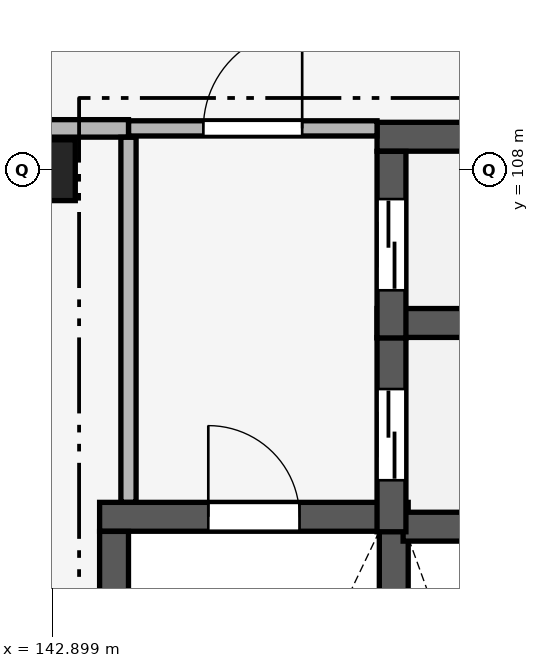
"""IFC4 building model, lengths in metres.
Left out: names, types, materials, properties, quantities, classifications, styles, units other than length and angle.
Written with IfcOpenShell. Run it as: python <this file> out.ifc"""

import sys

from ifc_helpers import new_model, si_unit, direction, frame, frame_2d, origin, origin_2d, place, context, subcontext, project, spatial, rectangle, extrude, element, fill, save


model = new_model("IFC4")
c1 = context("Model", 3, precision=1e-05, world=origin(), true_north=direction((0.0, 1.0)))
c2 = subcontext(c1, "Body", "Model", "MODEL_VIEW")
j1 = project(units=[si_unit("LENGTHUNIT", "METRE"), si_unit("PLANEANGLEUNIT", "RADIAN")], contexts=[c1])
p1 = place(None, origin())
s1 = spatial("IfcSite", under=j1, at=p1, CompositionType="ELEMENT")
p2 = place(p1, origin())
s2 = spatial("IfcBuilding", under=s1, at=p2, CompositionType="ELEMENT")
p3 = place(p2, frame((0.0, 0.0, 20.4)))
s3 = spatial("IfcBuildingStorey", under=s2, at=p3, CompositionType="ELEMENT", Elevation=20.4)
p4 = place(p3, frame((142.8, 108.0, 0.0), z_axis=(0.0, 0.0, 1.0), x_axis=(1.0, 0.0, 0.0)))
e1 = element("IfcColumn", 1, at=p4, inside=s3, PredefinedType="COLUMN", context=c2, shape_type="SweptSolid", body=[
    extrude(rectangle(XDim=0.8, YDim=0.8, at=origin_2d()), origin(), (0.0, 0.0, 1.0), 4.8),
])
p5 = place(p3, frame((143.52, 103.44, 0.0), z_axis=(0.0, 0.0, 1.0), x_axis=(1.0, 0.0, 0.0)))
e2 = element("IfcWall", 2, at=p5, inside=s3, PredefinedType="SHEAR", context=c2, shape_type="SweptSolid", body=[
    extrude(rectangle(XDim=4.06, YDim=0.38, at=frame_2d((2.03, 0.0))), origin(), (0.0, 0.0, 1.0), 4.55),
])
p6 = place(p5, frame((1.43, 0.0, 0.0)))
e3 = element("IfcOpeningElement", 3, at=p6, cuts=e2, PredefinedType="OPENING", context=c2, shape_type="SweptSolid", body=[
    extrude(rectangle(XDim=1.2, YDim=2.2, at=frame_2d((0.6, 1.1))), frame((0.0, 0.205, 0.0), z_axis=(0.0, -1.0, 0.0), x_axis=(1.0, 0.0, 0.0)), (0.0, 0.0, 1.0), 0.41),
])
for number, where, z_axis, x_axis in (
    (4, (143.71, 96.352, 0.0), (0.0, 0.0, 1.0), (0.0, 1.0, 0.0)),
    (5, (147.39, 96.352, 0.0), (0.0, 0.0, 1.0), (0.0, 1.0, 0.0)),
):
    element("IfcWall", number, at=place(p3, frame(where, z_axis=z_axis, x_axis=x_axis)), inside=s3, PredefinedType="SHEAR", context=c2, shape_type="SweptSolid", body=[
        extrude(rectangle(XDim=6.896, YDim=0.38, at=frame_2d((3.448, 0.0))), origin(), (0.0, 0.0, 1.0), 4.55),
    ])
p7 = place(p3, frame((147.513, 103.31, 0.0), z_axis=(0.0, 0.0, 1.0), x_axis=(1.0, 0.0, 0.0)))
e6 = element("IfcWall", 6, at=p7, inside=s3, PredefinedType="SHEAR", context=c2, shape_type="SweptSolid", body=[
    extrude(rectangle(XDim=2.917, YDim=0.38, at=frame_2d((1.458, 0.0))), origin(), (0.0, 0.0, 1.0), 4.55),
])
p8 = place(p3, frame((147.17, 105.99, 0.0), z_axis=(0.0, 0.0, 1.0), x_axis=(1.0, 0.0, 0.0)))
e7 = element("IfcWall", 7, at=p8, inside=s3, PredefinedType="SHEAR", context=c2, shape_type="SweptSolid", body=[
    extrude(rectangle(XDim=3.26, YDim=0.38, at=frame_2d((1.63, 0.0))), origin(), (0.0, 0.0, 1.0), 4.55),
])
p9 = place(p3, frame((147.36, 103.243, 0.0), z_axis=(0.0, 0.0, 1.0), x_axis=(0.0, 1.0, 0.0)))
e8 = element("IfcWall", 8, at=p9, inside=s3, PredefinedType="SHEAR", context=c2, shape_type="SweptSolid", body=[
    extrude(rectangle(XDim=2.555, YDim=0.38, at=frame_2d((1.278, 0.0))), origin(), (0.0, 0.0, 1.0), 4.55),
])
p10 = place(p9, frame((0.678, 0.0, 0.0)))
e9 = element("IfcOpeningElement", 9, at=p10, cuts=e8, PredefinedType="OPENING", context=c2, shape_type="SweptSolid", body=[
    extrude(rectangle(XDim=1.2, YDim=2.15, at=frame_2d((0.6, 1.075))), frame((0.0, 0.205, 0.0), z_axis=(0.0, -1.0, 0.0), x_axis=(1.0, 0.0, 0.0)), (0.0, 0.0, 1.0), 0.41),
])
p11 = place(p3, frame((147.17, 108.44, 0.0), z_axis=(0.0, 0.0, 1.0), x_axis=(1.0, 0.0, 0.0)))
e10 = element("IfcWall", 10, at=p11, inside=s3, PredefinedType="SHEAR", context=c2, shape_type="SweptSolid", body=[
    extrude(rectangle(XDim=3.637, YDim=0.38, at=frame_2d((1.818, 0.0))), origin(), (0.0, 0.0, 1.0), 4.55),
])
p12 = place(p3, frame((147.36, 105.793, 0.0), z_axis=(0.0, 0.0, 1.0), x_axis=(0.0, 1.0, 0.0)))
e11 = element("IfcWall", 11, at=p12, inside=s3, PredefinedType="SHEAR", context=c2, shape_type="SweptSolid", body=[
    extrude(rectangle(XDim=2.455, YDim=0.38, at=frame_2d((1.228, 0.0))), origin(), (0.0, 0.0, 1.0), 4.55),
])
p13 = place(p12, frame((0.627, 0.0, 0.0)))
e12 = element("IfcOpeningElement", 12, at=p13, cuts=e11, PredefinedType="OPENING", context=c2, shape_type="SweptSolid", body=[
    extrude(rectangle(XDim=1.2, YDim=2.15, at=frame_2d((0.6, 1.075))), frame((0.0, 0.205, 0.0), z_axis=(0.0, -1.0, 0.0), x_axis=(1.0, 0.0, 0.0)), (0.0, 0.0, 1.0), 0.41),
])
p14 = place(p3, frame((143.9, 108.55, 0.0), z_axis=(0.0, 0.0, 1.0), x_axis=(1.0, 0.0, 0.0)))
e13 = element("IfcWall", 13, at=p14, inside=s3, PredefinedType="PARTITIONING", context=c2, shape_type="SweptSolid", body=[
    extrude(rectangle(XDim=3.27, YDim=0.2, at=frame_2d((1.635, 0.0))), origin(), (0.0, 0.0, 1.0), 4.55),
])
p15 = place(p14, frame((0.985, 0.0, 0.0)))
e14 = element("IfcOpeningElement", 14, at=p15, cuts=e13, PredefinedType="OPENING", context=c2, shape_type="SweptSolid", body=[
    extrude(rectangle(XDim=1.3, YDim=2.2, at=frame_2d((0.65, 1.1))), frame((0.0, 0.115, 0.0), z_axis=(0.0, -1.0, 0.0), x_axis=(1.0, 0.0, 0.0)), (0.0, 0.0, 1.0), 0.23),
])
p16 = place(p3, frame((142.405, 108.55, 0.0), z_axis=(0.0, 0.0, 1.0), x_axis=(1.0, 0.0, 0.0)))
e15 = element("IfcWall", 15, at=p16, inside=s3, PredefinedType="SOLIDWALL", context=c2, shape_type="SweptSolid", body=[
    extrude(rectangle(XDim=1.495, YDim=0.23, at=frame_2d((0.748, 0.0))), origin(), (0.0, 0.0, 1.0), 4.0),
])
p17 = place(p3, frame((143.9, 103.632, 0.0), z_axis=(0.0, 0.0, 1.0), x_axis=(0.0, 1.0, 0.0)))
e16 = element("IfcWall", 16, at=p17, inside=s3, PredefinedType="PARTITIONING", context=c2, shape_type="SweptSolid", body=[
    extrude(rectangle(XDim=4.801, YDim=0.2, at=frame_2d((2.4, 0.0))), origin(), (0.0, 0.0, 1.0), 4.55),
])
p18 = place(p6, origin())
e17 = element("IfcDoor", 17, at=p18, inside=s3, OperationType="SINGLE_SWING_LEFT", PredefinedType="DOOR", context=c2, shape_type="SweptSolid", body=[
    extrude(rectangle(XDim=1.2, YDim=2.2, at=frame_2d((0.6, 1.1))), frame((0.0, 0.025, 0.0), z_axis=(0.0, -1.0, 0.0), x_axis=(1.0, 0.0, 0.0)), (0.0, 0.0, 1.0), 0.05),
])
fill(e3, e17)
p19 = place(p10, origin())
e18 = element("IfcDoor", 18, at=p19, inside=s3, OperationType="DOUBLE_DOOR_SLIDING", PredefinedType="DOOR", context=c2, shape_type="SweptSolid", body=[
    extrude(rectangle(XDim=1.2, YDim=2.15, at=frame_2d((0.6, 1.075))), frame((0.0, 0.025, 0.0), z_axis=(0.0, -1.0, 0.0), x_axis=(1.0, 0.0, 0.0)), (0.0, 0.0, 1.0), 0.05),
])
fill(e9, e18)
p20 = place(p13, origin())
e19 = element("IfcDoor", 19, at=p20, inside=s3, OperationType="DOUBLE_DOOR_SLIDING", PredefinedType="DOOR", context=c2, shape_type="SweptSolid", body=[
    extrude(rectangle(XDim=1.2, YDim=2.15, at=frame_2d((0.6, 1.075))), frame((0.0, 0.025, 0.0), z_axis=(0.0, -1.0, 0.0), x_axis=(1.0, 0.0, 0.0)), (0.0, 0.0, 1.0), 0.05),
])
fill(e12, e19)
p21 = place(p15, origin())
e20 = element("IfcDoor", 20, at=p21, inside=s3, OperationType="SINGLE_SWING_RIGHT", PredefinedType="DOOR", context=c2, shape_type="SweptSolid", body=[
    extrude(rectangle(XDim=1.3, YDim=2.2, at=frame_2d((0.65, 1.1))), frame((0.0, 0.025, 0.0), z_axis=(0.0, -1.0, 0.0), x_axis=(1.0, 0.0, 0.0)), (0.0, 0.0, 1.0), 0.05),
])
fill(e14, e20)
save(model, sys.argv[1])
